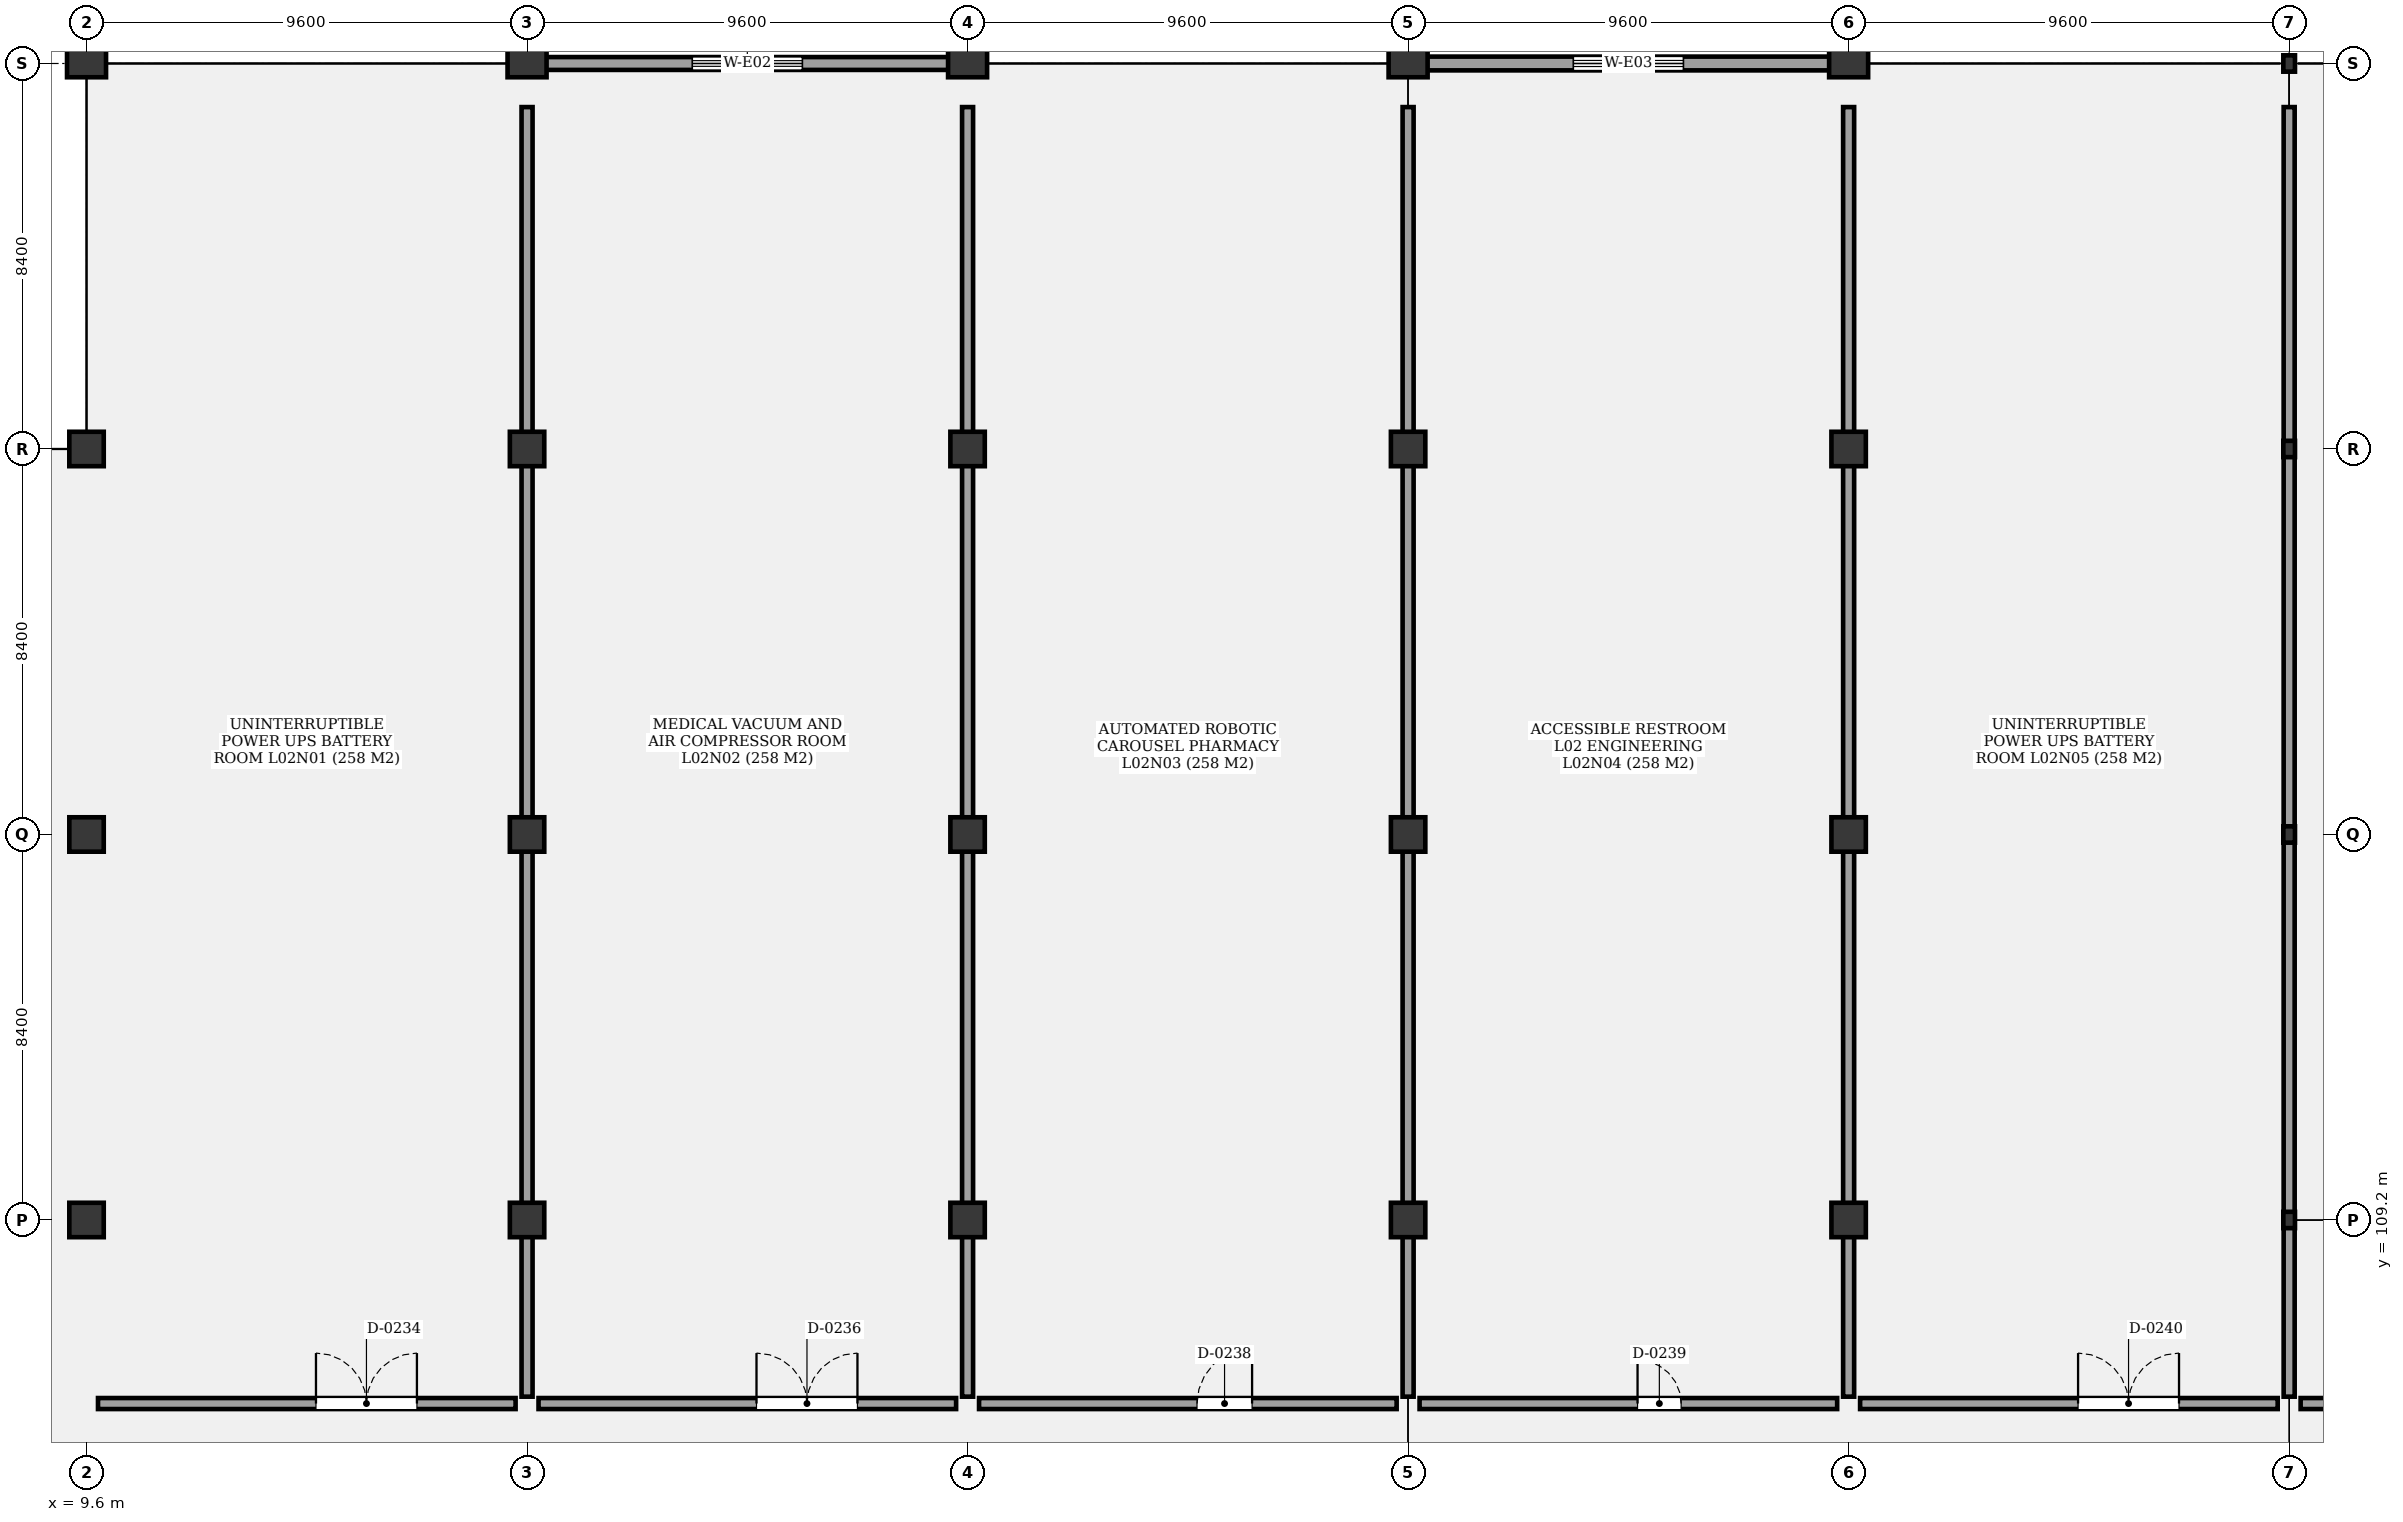
"""IFC4 building model, lengths in metres.
Left out: names, types, materials, properties, quantities, classifications, styles, units other than length and angle.
Written with IfcOpenShell. Run it as: python <this file> out.ifc"""

import sys

from ifc_helpers import new_model, si_unit, direction, frame, frame_2d, origin, origin_2d, place, context, subcontext, project, spatial, rectangle, i_section, extrude, element, fill, save


model = new_model("IFC4")
c1 = context("Model", 3, precision=1e-05, world=origin(), true_north=direction((0.0, 1.0)))
c2 = subcontext(c1, "Body", "Model", "MODEL_VIEW")
j1 = project(units=[si_unit("LENGTHUNIT", "METRE"), si_unit("PLANEANGLEUNIT", "RADIAN")], contexts=[c1])
p1 = place(None, origin())
s1 = spatial("IfcSite", under=j1, at=p1, CompositionType="ELEMENT")
p2 = place(p1, origin())
s2 = spatial("IfcBuilding", under=s1, at=p2, CompositionType="ELEMENT")
p3 = place(p2, frame((0.0, 0.0, 9.9)))
s3 = spatial("IfcBuildingStorey", under=s2, at=p3, CompositionType="ELEMENT", Elevation=9.9)
for number, where, z_axis, x_axis in (
    (1, (9.6, 109.2, 0.0), (0.0, 0.0, 1.0), (1.0, 0.0, 0.0)),
    (2, (9.6, 117.6, 0.0), (0.0, 0.0, 1.0), (1.0, 0.0, 0.0)),
    (3, (9.6, 126.0, 0.0), (0.0, 0.0, 1.0), (1.0, 0.0, 0.0)),
):
    element("IfcColumn", number, at=place(p3, frame(where, z_axis=z_axis, x_axis=x_axis)), inside=s3, PredefinedType="COLUMN", context=c2, shape_type="SweptSolid", body=[
        extrude(rectangle(XDim=0.75, YDim=0.75, at=origin_2d()), origin(), (0.0, 0.0, 1.0), 3.6),
    ])
p4 = place(p3, frame((9.6, 134.4, 0.0), z_axis=(0.0, 0.0, 1.0), x_axis=(1.0, 0.0, 0.0)))
e4 = element("IfcColumn", 4, at=p4, inside=s3, PredefinedType="COLUMN", context=c2, shape_type="SweptSolid", body=[
    extrude(rectangle(XDim=0.85, YDim=0.6, at=origin_2d()), origin(), (0.0, 0.0, 1.0), 3.6),
])
for number, where, z_axis, x_axis in (
    (5, (19.2, 109.2, 0.0), (0.0, 0.0, 1.0), (1.0, 0.0, 0.0)),
    (6, (19.2, 117.6, 0.0), (0.0, 0.0, 1.0), (1.0, 0.0, 0.0)),
    (7, (19.2, 126.0, 0.0), (0.0, 0.0, 1.0), (1.0, 0.0, 0.0)),
):
    element("IfcColumn", number, at=place(p3, frame(where, z_axis=z_axis, x_axis=x_axis)), inside=s3, PredefinedType="COLUMN", context=c2, shape_type="SweptSolid", body=[
        extrude(rectangle(XDim=0.75, YDim=0.75, at=origin_2d()), origin(), (0.0, 0.0, 1.0), 3.6),
    ])
p5 = place(p3, frame((19.2, 134.4, 0.0), z_axis=(0.0, 0.0, 1.0), x_axis=(1.0, 0.0, 0.0)))
e8 = element("IfcColumn", 8, at=p5, inside=s3, PredefinedType="COLUMN", context=c2, shape_type="SweptSolid", body=[
    extrude(rectangle(XDim=0.85, YDim=0.6, at=origin_2d()), origin(), (0.0, 0.0, 1.0), 3.6),
])
for number, where, z_axis, x_axis in (
    (9, (28.8, 109.2, 0.0), (0.0, 0.0, 1.0), (1.0, 0.0, 0.0)),
    (10, (28.8, 117.6, 0.0), (0.0, 0.0, 1.0), (1.0, 0.0, 0.0)),
    (11, (28.8, 126.0, 0.0), (0.0, 0.0, 1.0), (1.0, 0.0, 0.0)),
):
    element("IfcColumn", number, at=place(p3, frame(where, z_axis=z_axis, x_axis=x_axis)), inside=s3, PredefinedType="COLUMN", context=c2, shape_type="SweptSolid", body=[
        extrude(rectangle(XDim=0.75, YDim=0.75, at=origin_2d()), origin(), (0.0, 0.0, 1.0), 3.6),
    ])
p6 = place(p3, frame((28.8, 134.4, 0.0), z_axis=(0.0, 0.0, 1.0), x_axis=(1.0, 0.0, 0.0)))
e12 = element("IfcColumn", 12, at=p6, inside=s3, PredefinedType="COLUMN", context=c2, shape_type="SweptSolid", body=[
    extrude(rectangle(XDim=0.85, YDim=0.6, at=origin_2d()), origin(), (0.0, 0.0, 1.0), 3.6),
])
for number, where, z_axis, x_axis in (
    (13, (38.4, 109.2, 0.0), (0.0, 0.0, 1.0), (1.0, 0.0, 0.0)),
    (14, (38.4, 117.6, 0.0), (0.0, 0.0, 1.0), (1.0, 0.0, 0.0)),
    (15, (38.4, 126.0, 0.0), (0.0, 0.0, 1.0), (1.0, 0.0, 0.0)),
):
    element("IfcColumn", number, at=place(p3, frame(where, z_axis=z_axis, x_axis=x_axis)), inside=s3, PredefinedType="COLUMN", context=c2, shape_type="SweptSolid", body=[
        extrude(rectangle(XDim=0.75, YDim=0.75, at=origin_2d()), origin(), (0.0, 0.0, 1.0), 3.6),
    ])
p7 = place(p3, frame((38.4, 134.4, 0.0), z_axis=(0.0, 0.0, 1.0), x_axis=(1.0, 0.0, 0.0)))
e16 = element("IfcColumn", 16, at=p7, inside=s3, PredefinedType="COLUMN", context=c2, shape_type="SweptSolid", body=[
    extrude(rectangle(XDim=0.85, YDim=0.6, at=origin_2d()), origin(), (0.0, 0.0, 1.0), 3.6),
])
for number, where, z_axis, x_axis in (
    (17, (48.0, 109.2, 0.0), (0.0, 0.0, 1.0), (1.0, 0.0, 0.0)),
    (18, (48.0, 117.6, 0.0), (0.0, 0.0, 1.0), (1.0, 0.0, 0.0)),
    (19, (48.0, 126.0, 0.0), (0.0, 0.0, 1.0), (1.0, 0.0, 0.0)),
):
    element("IfcColumn", number, at=place(p3, frame(where, z_axis=z_axis, x_axis=x_axis)), inside=s3, PredefinedType="COLUMN", context=c2, shape_type="SweptSolid", body=[
        extrude(rectangle(XDim=0.75, YDim=0.75, at=origin_2d()), origin(), (0.0, 0.0, 1.0), 3.6),
    ])
p8 = place(p3, frame((48.0, 134.4, 0.0), z_axis=(0.0, 0.0, 1.0), x_axis=(1.0, 0.0, 0.0)))
e20 = element("IfcColumn", 20, at=p8, inside=s3, PredefinedType="COLUMN", context=c2, shape_type="SweptSolid", body=[
    extrude(rectangle(XDim=0.85, YDim=0.6, at=origin_2d()), origin(), (0.0, 0.0, 1.0), 3.6),
])
for number, where, z_axis, x_axis in (
    (21, (57.6, 109.2, 0.0), (0.0, 0.0, 1.0), (0.0, -1.0, 0.0)),
    (22, (57.6, 117.6, 0.0), (0.0, 0.0, 1.0), (0.0, -1.0, 0.0)),
    (23, (57.6, 126.0, 0.0), (0.0, 0.0, 1.0), (0.0, -1.0, 0.0)),
    (24, (57.6, 134.4, 0.0), (0.0, 0.0, 1.0), (0.0, -1.0, 0.0)),
):
    element("IfcColumn", number, at=place(p3, frame(where, z_axis=z_axis, x_axis=x_axis)), inside=s3, PredefinedType="COLUMN", context=c2, shape_type="SweptSolid", body=[
        extrude(i_section(OverallWidth=0.254, OverallDepth=0.356, WebThickness=0.011, FlangeThickness=0.018, at=origin_2d()), origin(), (0.0, 0.0, 1.0), 3.6),
    ])
p9 = place(p3, frame((19.2, 134.4, 0.0), z_axis=(0.0, 0.0, 1.0), x_axis=(1.0, 0.0, 0.0)))
e25 = element("IfcWall", 25, at=p9, inside=s3, PredefinedType="SOLIDWALL", context=c2, shape_type="SweptSolid", body=[
    extrude(rectangle(XDim=9.6, YDim=0.28, at=frame_2d((4.8, 0.0))), origin(), (0.0, 0.0, 1.0), 2.57),
])
p10 = place(p9, frame((3.6, 0.0, 0.85)))
e26 = element("IfcOpeningElement", 26, at=p10, cuts=e25, PredefinedType="OPENING", context=c2, shape_type="SweptSolid", body=[
    extrude(rectangle(XDim=2.4, YDim=1.2, at=frame_2d((1.2, 0.6))), frame((0.0, 0.15, 0.0), z_axis=(0.0, -1.0, 0.0), x_axis=(1.0, 0.0, 0.0)), (0.0, 0.0, 1.0), 0.3),
])
p11 = place(p3, frame((38.4, 134.4, 0.0), z_axis=(0.0, 0.0, 1.0), x_axis=(1.0, 0.0, 0.0)))
e27 = element("IfcWall", 27, at=p11, inside=s3, PredefinedType="SOLIDWALL", context=c2, shape_type="SweptSolid", body=[
    extrude(rectangle(XDim=9.6, YDim=0.3, at=frame_2d((4.8, 0.0))), origin(), (0.0, 0.0, 1.0), 2.57),
])
p12 = place(p11, frame((3.6, 0.0, 0.85)))
e28 = element("IfcOpeningElement", 28, at=p12, cuts=e27, PredefinedType="OPENING", context=c2, shape_type="SweptSolid", body=[
    extrude(rectangle(XDim=2.4, YDim=1.2, at=frame_2d((1.2, 0.6))), frame((0.0, 0.16, 0.0), z_axis=(0.0, -1.0, 0.0), x_axis=(1.0, 0.0, 0.0)), (0.0, 0.0, 1.0), 0.32),
])
p13 = place(p3, frame((9.85, 105.2, 0.0), z_axis=(0.0, 0.0, 1.0), x_axis=(1.0, 0.0, 0.0)))
e29 = element("IfcWall", 29, at=p13, inside=s3, PredefinedType="PARTITIONING", context=c2, shape_type="SweptSolid", body=[
    extrude(rectangle(XDim=9.1, YDim=0.24, at=frame_2d((4.55, 0.0))), origin(), (0.0, 0.0, 1.0), 2.48),
])
p14 = place(p13, frame((4.75, 0.0, 0.0)))
e30 = element("IfcOpeningElement", 30, at=p14, cuts=e29, PredefinedType="OPENING", context=c2, shape_type="SweptSolid", body=[
    extrude(rectangle(XDim=2.2, YDim=2.4, at=frame_2d((1.1, 1.2))), frame((0.0, 0.13, 0.0), z_axis=(0.0, -1.0, 0.0), x_axis=(1.0, 0.0, 0.0)), (0.0, 0.0, 1.0), 0.26),
])
p15 = place(p3, frame((19.45, 105.2, 0.0), z_axis=(0.0, 0.0, 1.0), x_axis=(1.0, 0.0, 0.0)))
e31 = element("IfcWall", 31, at=p15, inside=s3, PredefinedType="PARTITIONING", context=c2, shape_type="SweptSolid", body=[
    extrude(rectangle(XDim=9.1, YDim=0.24, at=frame_2d((4.55, 0.0))), origin(), (0.0, 0.0, 1.0), 2.48),
])
p16 = place(p15, frame((4.75, 0.0, 0.0)))
e32 = element("IfcOpeningElement", 32, at=p16, cuts=e31, PredefinedType="OPENING", context=c2, shape_type="SweptSolid", body=[
    extrude(rectangle(XDim=2.2, YDim=2.4, at=frame_2d((1.1, 1.2))), frame((0.0, 0.13, 0.0), z_axis=(0.0, -1.0, 0.0), x_axis=(1.0, 0.0, 0.0)), (0.0, 0.0, 1.0), 0.26),
])
p17 = place(p3, frame((19.2, 105.35, 0.0), z_axis=(0.0, 0.0, 1.0), x_axis=(0.0, 1.0, 0.0)))
e33 = element("IfcWall", 33, at=p17, inside=s3, PredefinedType="PARTITIONING", context=c2, shape_type="SweptSolid", body=[
    extrude(rectangle(XDim=28.1, YDim=0.24, at=frame_2d((14.05, 0.0))), origin(), (0.0, 0.0, 1.0), 2.48),
])
p18 = place(p3, frame((29.05, 105.2, 0.0), z_axis=(0.0, 0.0, 1.0), x_axis=(1.0, 0.0, 0.0)))
e34 = element("IfcWall", 34, at=p18, inside=s3, PredefinedType="PARTITIONING", context=c2, shape_type="SweptSolid", body=[
    extrude(rectangle(XDim=9.1, YDim=0.24, at=frame_2d((4.55, 0.0))), origin(), (0.0, 0.0, 1.0), 2.48),
])
p19 = place(p18, frame((4.75, 0.0, 0.0)))
e35 = element("IfcOpeningElement", 35, at=p19, cuts=e34, PredefinedType="OPENING", context=c2, shape_type="SweptSolid", body=[
    extrude(rectangle(XDim=1.2, YDim=2.4, at=frame_2d((0.6, 1.2))), frame((0.0, 0.13, 0.0), z_axis=(0.0, -1.0, 0.0), x_axis=(1.0, 0.0, 0.0)), (0.0, 0.0, 1.0), 0.26),
])
p20 = place(p3, frame((28.8, 105.35, 0.0), z_axis=(0.0, 0.0, 1.0), x_axis=(0.0, 1.0, 0.0)))
e36 = element("IfcWall", 36, at=p20, inside=s3, PredefinedType="PARTITIONING", context=c2, shape_type="SweptSolid", body=[
    extrude(rectangle(XDim=28.1, YDim=0.24, at=frame_2d((14.05, 0.0))), origin(), (0.0, 0.0, 1.0), 2.48),
])
p21 = place(p3, frame((38.65, 105.2, 0.0), z_axis=(0.0, 0.0, 1.0), x_axis=(1.0, 0.0, 0.0)))
e37 = element("IfcWall", 37, at=p21, inside=s3, PredefinedType="PARTITIONING", context=c2, shape_type="SweptSolid", body=[
    extrude(rectangle(XDim=9.1, YDim=0.24, at=frame_2d((4.55, 0.0))), origin(), (0.0, 0.0, 1.0), 2.48),
])
p22 = place(p21, frame((4.75, 0.0, 0.0)))
e38 = element("IfcOpeningElement", 38, at=p22, cuts=e37, PredefinedType="OPENING", context=c2, shape_type="SweptSolid", body=[
    extrude(rectangle(XDim=0.95, YDim=2.1, at=frame_2d((0.475, 1.05))), frame((0.0, 0.13, 0.0), z_axis=(0.0, -1.0, 0.0), x_axis=(1.0, 0.0, 0.0)), (0.0, 0.0, 1.0), 0.26),
])
p23 = place(p3, frame((38.4, 105.35, 0.0), z_axis=(0.0, 0.0, 1.0), x_axis=(0.0, 1.0, 0.0)))
e39 = element("IfcWall", 39, at=p23, inside=s3, PredefinedType="PARTITIONING", context=c2, shape_type="SweptSolid", body=[
    extrude(rectangle(XDim=28.1, YDim=0.24, at=frame_2d((14.05, 0.0))), origin(), (0.0, 0.0, 1.0), 2.48),
])
p24 = place(p3, frame((48.25, 105.2, 0.0), z_axis=(0.0, 0.0, 1.0), x_axis=(1.0, 0.0, 0.0)))
e40 = element("IfcWall", 40, at=p24, inside=s3, PredefinedType="PARTITIONING", context=c2, shape_type="SweptSolid", body=[
    extrude(rectangle(XDim=9.1, YDim=0.24, at=frame_2d((4.55, 0.0))), origin(), (0.0, 0.0, 1.0), 2.48),
])
p25 = place(p24, frame((4.75, 0.0, 0.0)))
e41 = element("IfcOpeningElement", 41, at=p25, cuts=e40, PredefinedType="OPENING", context=c2, shape_type="SweptSolid", body=[
    extrude(rectangle(XDim=2.2, YDim=2.4, at=frame_2d((1.1, 1.2))), frame((0.0, 0.13, 0.0), z_axis=(0.0, -1.0, 0.0), x_axis=(1.0, 0.0, 0.0)), (0.0, 0.0, 1.0), 0.26),
])
p26 = place(p3, frame((48.0, 105.35, 0.0), z_axis=(0.0, 0.0, 1.0), x_axis=(0.0, 1.0, 0.0)))
e42 = element("IfcWall", 42, at=p26, inside=s3, PredefinedType="PARTITIONING", context=c2, shape_type="SweptSolid", body=[
    extrude(rectangle(XDim=28.1, YDim=0.24, at=frame_2d((14.05, 0.0))), origin(), (0.0, 0.0, 1.0), 2.48),
])
p27 = place(p3, frame((57.85, 105.2, 0.0), z_axis=(0.0, 0.0, 1.0), x_axis=(1.0, 0.0, 0.0)))
e43 = element("IfcWall", 43, at=p27, inside=s3, PredefinedType="PARTITIONING", context=c2, shape_type="SweptSolid", body=[
    extrude(rectangle(XDim=9.1, YDim=0.24, at=frame_2d((4.55, 0.0))), origin(), (0.0, 0.0, 1.0), 2.48),
])
p28 = place(p27, frame((4.75, 0.0, 0.0)))
e44 = element("IfcOpeningElement", 44, at=p28, cuts=e43, PredefinedType="OPENING", context=c2, shape_type="SweptSolid", body=[
    extrude(rectangle(XDim=2.2, YDim=2.4, at=frame_2d((1.1, 1.2))), frame((0.0, 0.13, 0.0), z_axis=(0.0, -1.0, 0.0), x_axis=(1.0, 0.0, 0.0)), (0.0, 0.0, 1.0), 0.26),
])
p29 = place(p3, frame((57.6, 105.35, 0.0), z_axis=(0.0, 0.0, 1.0), x_axis=(0.0, 1.0, 0.0)))
e45 = element("IfcWall", 45, at=p29, inside=s3, PredefinedType="PARTITIONING", context=c2, shape_type="SweptSolid", body=[
    extrude(rectangle(XDim=28.1, YDim=0.24, at=frame_2d((14.05, 0.0))), origin(), (0.0, 0.0, 1.0), 2.48),
])
p30 = place(p10, origin())
e46 = element("IfcWindow", 46, at=p30, inside=s3, PartitioningType="SINGLE_PANEL", PredefinedType="WINDOW", context=c2, shape_type="SweptSolid", body=[
    extrude(rectangle(XDim=2.4, YDim=1.2, at=frame_2d((1.2, 0.6))), frame((0.0, 0.03, 0.0), z_axis=(0.0, -1.0, 0.0), x_axis=(1.0, 0.0, 0.0)), (0.0, 0.0, 1.0), 0.06),
])
fill(e26, e46)
p31 = place(p12, origin())
e47 = element("IfcWindow", 47, at=p31, inside=s3, PartitioningType="SINGLE_PANEL", PredefinedType="WINDOW", context=c2, shape_type="SweptSolid", body=[
    extrude(rectangle(XDim=2.4, YDim=1.2, at=frame_2d((1.2, 0.6))), frame((0.0, 0.03, 0.0), z_axis=(0.0, -1.0, 0.0), x_axis=(1.0, 0.0, 0.0)), (0.0, 0.0, 1.0), 0.06),
])
fill(e28, e47)
p32 = place(p14, origin())
e48 = element("IfcDoor", 48, at=p32, inside=s3, OperationType="DOUBLE_DOOR_SINGLE_SWING", PredefinedType="DOOR", context=c2, shape_type="SweptSolid", body=[
    extrude(rectangle(XDim=2.2, YDim=2.4, at=frame_2d((1.1, 1.2))), frame((0.0, 0.025, 0.0), z_axis=(0.0, -1.0, 0.0), x_axis=(1.0, 0.0, 0.0)), (0.0, 0.0, 1.0), 0.05),
])
fill(e30, e48)
p33 = place(p16, origin())
e49 = element("IfcDoor", 49, at=p33, inside=s3, OperationType="DOUBLE_DOOR_SINGLE_SWING", PredefinedType="DOOR", context=c2, shape_type="SweptSolid", body=[
    extrude(rectangle(XDim=2.2, YDim=2.4, at=frame_2d((1.1, 1.2))), frame((0.0, 0.025, 0.0), z_axis=(0.0, -1.0, 0.0), x_axis=(1.0, 0.0, 0.0)), (0.0, 0.0, 1.0), 0.05),
])
fill(e32, e49)
p34 = place(p19, origin())
e50 = element("IfcDoor", 50, at=p34, inside=s3, OperationType="SINGLE_SWING_RIGHT", PredefinedType="DOOR", context=c2, shape_type="SweptSolid", body=[
    extrude(rectangle(XDim=1.2, YDim=2.4, at=frame_2d((0.6, 1.2))), frame((0.0, 0.025, 0.0), z_axis=(0.0, -1.0, 0.0), x_axis=(1.0, 0.0, 0.0)), (0.0, 0.0, 1.0), 0.05),
])
fill(e35, e50)
p35 = place(p22, origin())
e51 = element("IfcDoor", 51, at=p35, inside=s3, OperationType="SINGLE_SWING_LEFT", PredefinedType="DOOR", context=c2, shape_type="SweptSolid", body=[
    extrude(rectangle(XDim=0.95, YDim=2.1, at=frame_2d((0.475, 1.05))), frame((0.0, 0.025, 0.0), z_axis=(0.0, -1.0, 0.0), x_axis=(1.0, 0.0, 0.0)), (0.0, 0.0, 1.0), 0.05),
])
fill(e38, e51)
p36 = place(p25, origin())
e52 = element("IfcDoor", 52, at=p36, inside=s3, OperationType="DOUBLE_DOOR_SINGLE_SWING", PredefinedType="DOOR", context=c2, shape_type="SweptSolid", body=[
    extrude(rectangle(XDim=2.2, YDim=2.4, at=frame_2d((1.1, 1.2))), frame((0.0, 0.025, 0.0), z_axis=(0.0, -1.0, 0.0), x_axis=(1.0, 0.0, 0.0)), (0.0, 0.0, 1.0), 0.05),
])
fill(e41, e52)
save(model, sys.argv[1])
